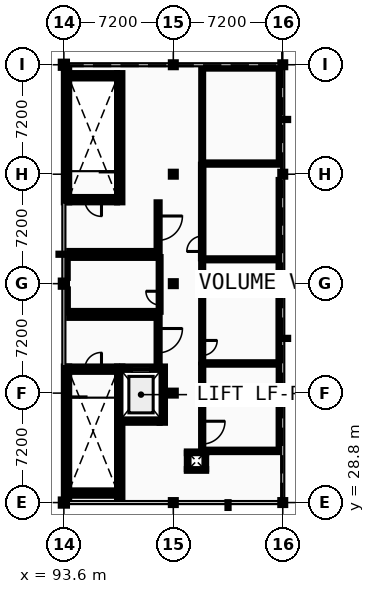
"""IFC4 building model, lengths in metres.
Left out: names, types, materials, properties, quantities, classifications, styles, units other than length and angle.
Written with IfcOpenShell. Run it as: python <this file> out.ifc"""

import sys

from ifc_helpers import new_model, si_unit, direction, frame, frame_2d, origin, origin_2d, place, context, subcontext, project, spatial, rectangle, hollow_circle, extrude, element, fill, save


model = new_model("IFC4")
c1 = context("Model", 3, precision=1e-05, world=origin(), true_north=direction((0.0, 1.0)))
c2 = subcontext(c1, "Body", "Model", "MODEL_VIEW")
j1 = project(units=[si_unit("LENGTHUNIT", "METRE"), si_unit("PLANEANGLEUNIT", "RADIAN")], contexts=[c1])
p1 = place(None, origin())
s1 = spatial("IfcSite", under=j1, at=p1, CompositionType="ELEMENT")
p2 = place(p1, origin())
s2 = spatial("IfcBuilding", under=s1, at=p2, CompositionType="ELEMENT")
p3 = place(p2, frame((0.0, 0.0, 9.6)))
s3 = spatial("IfcBuildingStorey", under=s2, at=p3, CompositionType="ELEMENT", Elevation=9.6)
for number, where, z_axis, x_axis in (
    (1, (93.6, 28.8, 0.0), (0.0, 0.0, 1.0), (1.0, 0.0, 0.0)),
    (2, (93.6, 43.2, 0.0), (0.0, 0.0, 1.0), (1.0, 0.0, 0.0)),
    (3, (93.6, 57.6, 0.0), (0.0, 0.0, 1.0), (1.0, 0.0, 0.0)),
):
    element("IfcColumn", number, at=place(p3, frame(where, z_axis=z_axis, x_axis=x_axis)), inside=s3, PredefinedType="COLUMN", context=c2, shape_type="SweptSolid", body=[
        extrude(hollow_circle(Radius=0.203, WallThickness=0.016, at=origin_2d()), origin(), (0.0, 0.0, 1.0), 4.4),
    ])
for number, where, z_axis, x_axis in (
    (4, (100.8, 28.8, 0.0), (0.0, 0.0, 1.0), (1.0, 0.0, 0.0)),
    (5, (100.8, 36.0, 0.0), (0.0, 0.0, 1.0), (1.0, 0.0, 0.0)),
    (6, (100.8, 43.2, 0.0), (0.0, 0.0, 1.0), (1.0, 0.0, 0.0)),
    (7, (100.8, 50.4, 0.0), (0.0, 0.0, 1.0), (1.0, 0.0, 0.0)),
    (8, (100.8, 57.6, 0.0), (0.0, 0.0, 1.0), (1.0, 0.0, 0.0)),
    (9, (108.0, 28.8, 0.0), (0.0, 0.0, 1.0), (1.0, 0.0, 0.0)),
    (10, (108.0, 36.0, 0.0), (0.0, 0.0, 1.0), (1.0, 0.0, 0.0)),
    (11, (108.0, 43.2, 0.0), (0.0, 0.0, 1.0), (1.0, 0.0, 0.0)),
    (12, (108.0, 50.4, 0.0), (0.0, 0.0, 1.0), (1.0, 0.0, 0.0)),
    (13, (108.0, 57.6, 0.0), (0.0, 0.0, 1.0), (1.0, 0.0, 0.0)),
):
    element("IfcColumn", number, at=place(p3, frame(where, z_axis=z_axis, x_axis=x_axis)), inside=s3, PredefinedType="COLUMN", context=c2, shape_type="SweptSolid", body=[
        extrude(hollow_circle(Radius=0.162, WallThickness=0.012, at=origin_2d()), origin(), (0.0, 0.0, 1.0), 4.4),
    ])
p4 = place(p3, frame((93.95, 29.425, 0.0), z_axis=(0.0, 0.0, 1.0), x_axis=(1.0, 0.0, 0.0)))
e14 = element("IfcWall", 14, at=p4, inside=s3, PredefinedType="SHEAR", context=c2, shape_type="SweptSolid", body=[
    extrude(rectangle(XDim=3.15, YDim=0.35, at=frame_2d((1.575, 0.0))), origin(), (0.0, 0.0, 1.0), 4.18),
])
p5 = place(p3, frame((93.95, 37.575, 0.0), z_axis=(0.0, 0.0, 1.0), x_axis=(1.0, 0.0, 0.0)))
e15 = element("IfcWall", 15, at=p5, inside=s3, PredefinedType="SHEAR", context=c2, shape_type="SweptSolid", body=[
    extrude(rectangle(XDim=3.15, YDim=0.35, at=frame_2d((1.575, 0.0))), origin(), (0.0, 0.0, 1.0), 4.18),
])
p6 = place(p5, frame((1.025, 0.0, 0.0)))
e16 = element("IfcOpeningElement", 16, at=p6, cuts=e15, PredefinedType="OPENING", context=c2, shape_type="SweptSolid", body=[
    extrude(rectangle(XDim=1.1, YDim=2.15, at=frame_2d((0.55, 1.075))), frame((0.0, 0.185, 0.0), z_axis=(0.0, -1.0, 0.0), x_axis=(1.0, 0.0, 0.0)), (0.0, 0.0, 1.0), 0.37),
])
p7 = place(p3, frame((93.775, 29.0, 0.0), z_axis=(0.0, 0.0, 1.0), x_axis=(0.0, 1.0, 0.0)))
e17 = element("IfcWall", 17, at=p7, inside=s3, PredefinedType="SHEAR", context=c2, shape_type="SweptSolid", body=[
    extrude(rectangle(XDim=8.75, YDim=0.35, at=frame_2d((4.375, 0.0))), origin(), (0.0, 0.0, 1.0), 4.0),
])
p8 = place(p3, frame((97.275, 29.0, 0.0), z_axis=(0.0, 0.0, 1.0), x_axis=(0.0, 1.0, 0.0)))
e18 = element("IfcWall", 18, at=p8, inside=s3, PredefinedType="SHEAR", context=c2, shape_type="SweptSolid", body=[
    extrude(rectangle(XDim=8.75, YDim=0.35, at=frame_2d((4.375, 0.0))), origin(), (0.0, 0.0, 1.0), 4.18),
])
p9 = place(p3, frame((97.45, 34.225, 0.0), z_axis=(0.0, 0.0, 1.0), x_axis=(1.0, 0.0, 0.0)))
e19 = element("IfcWall", 19, at=p9, inside=s3, PredefinedType="SHEAR", context=c2, shape_type="SweptSolid", body=[
    extrude(rectangle(XDim=2.45, YDim=0.35, at=frame_2d((1.225, 0.0))), origin(), (0.0, 0.0, 1.0), 4.18),
])
p10 = place(p3, frame((97.45, 37.575, 0.0), z_axis=(0.0, 0.0, 1.0), x_axis=(1.0, 0.0, 0.0)))
e20 = element("IfcWall", 20, at=p10, inside=s3, PredefinedType="SHEAR", context=c2, shape_type="SweptSolid", body=[
    extrude(rectangle(XDim=2.45, YDim=0.35, at=frame_2d((1.225, 0.0))), origin(), (0.0, 0.0, 1.0), 4.18),
])
p11 = place(p10, frame((0.625, 0.0, 0.0)))
e21 = element("IfcOpeningElement", 21, at=p11, cuts=e20, PredefinedType="OPENING", context=c2, shape_type="SweptSolid", body=[
    extrude(rectangle(XDim=1.2, YDim=2.2, at=frame_2d((0.6, 1.1))), frame((0.0, 0.185, 0.0), z_axis=(0.0, -1.0, 0.0), x_axis=(1.0, 0.0, 0.0)), (0.0, 0.0, 1.0), 0.37),
])
p12 = place(p3, frame((100.075, 34.05, 0.0), z_axis=(0.0, 0.0, 1.0), x_axis=(0.0, 1.0, 0.0)))
e22 = element("IfcWall", 22, at=p12, inside=s3, PredefinedType="SHEAR", context=c2, shape_type="SweptSolid", body=[
    extrude(rectangle(XDim=3.7, YDim=0.35, at=frame_2d((1.85, 0.0))), origin(), (0.0, 0.0, 1.0), 4.18),
])
p13 = place(p3, frame((99.8, 37.75, 0.0), z_axis=(0.0, 0.0, 1.0), x_axis=(0.0, 1.0, 0.0)))
e23 = element("IfcWall", 23, at=p13, inside=s3, PredefinedType="PARTITIONING", context=c2, shape_type="SweptSolid", body=[
    extrude(rectangle(XDim=3.4, YDim=0.2, at=frame_2d((1.7, 0.0))), origin(), (0.0, 0.0, 1.0), 4.18),
])
p14 = place(p13, frame((0.9, 0.0, 0.0)))
e24 = element("IfcOpeningElement", 24, at=p14, cuts=e23, PredefinedType="OPENING", context=c2, shape_type="SweptSolid", body=[
    extrude(rectangle(XDim=1.6, YDim=2.2, at=frame_2d((0.8, 1.1))), frame((0.0, 0.11, 0.0), z_axis=(0.0, -1.0, 0.0), x_axis=(1.0, 0.0, 0.0)), (0.0, 0.0, 1.0), 0.22),
])
p15 = place(p3, frame((93.95, 41.05, 0.0), z_axis=(0.0, 0.0, 1.0), x_axis=(1.0, 0.0, 0.0)))
e25 = element("IfcWall", 25, at=p15, inside=s3, PredefinedType="PARTITIONING", context=c2, shape_type="SweptSolid", body=[
    extrude(rectangle(XDim=5.75, YDim=0.2, at=frame_2d((2.875, 0.0))), origin(), (0.0, 0.0, 1.0), 4.18),
])
p16 = place(p3, frame((93.95, 48.725, 0.0), z_axis=(0.0, 0.0, 1.0), x_axis=(1.0, 0.0, 0.0)))
e26 = element("IfcWall", 26, at=p16, inside=s3, PredefinedType="SHEAR", context=c2, shape_type="SweptSolid", body=[
    extrude(rectangle(XDim=3.15, YDim=0.35, at=frame_2d((1.575, 0.0))), origin(), (0.0, 0.0, 1.0), 4.18),
])
p17 = place(p16, frame((1.025, 0.0, 0.0)))
e27 = element("IfcOpeningElement", 27, at=p17, cuts=e26, PredefinedType="OPENING", context=c2, shape_type="SweptSolid", body=[
    extrude(rectangle(XDim=1.1, YDim=2.15, at=frame_2d((0.55, 1.075))), frame((0.0, 0.185, 0.0), z_axis=(0.0, -1.0, 0.0), x_axis=(1.0, 0.0, 0.0)), (0.0, 0.0, 1.0), 0.37),
])
p18 = place(p3, frame((93.95, 56.875, 0.0), z_axis=(0.0, 0.0, 1.0), x_axis=(1.0, 0.0, 0.0)))
e28 = element("IfcWall", 28, at=p18, inside=s3, PredefinedType="SHEAR", context=c2, shape_type="SweptSolid", body=[
    extrude(rectangle(XDim=3.15, YDim=0.35, at=frame_2d((1.575, 0.0))), origin(), (0.0, 0.0, 1.0), 4.18),
])
p19 = place(p3, frame((93.775, 48.55, 0.0), z_axis=(0.0, 0.0, 1.0), x_axis=(0.0, 1.0, 0.0)))
e29 = element("IfcWall", 29, at=p19, inside=s3, PredefinedType="SHEAR", context=c2, shape_type="SweptSolid", body=[
    extrude(rectangle(XDim=8.847, YDim=0.35, at=frame_2d((4.423, 0.0))), origin(), (0.0, 0.0, 1.0), 4.0),
])
p20 = place(p3, frame((97.275, 48.55, 0.0), z_axis=(0.0, 0.0, 1.0), x_axis=(0.0, 1.0, 0.0)))
e30 = element("IfcWall", 30, at=p20, inside=s3, PredefinedType="SHEAR", context=c2, shape_type="SweptSolid", body=[
    extrude(rectangle(XDim=8.5, YDim=0.35, at=frame_2d((4.25, 0.0))), origin(), (0.0, 0.0, 1.0), 4.18),
])
p21 = place(p3, frame((99.8, 45.15, 0.0), z_axis=(0.0, 0.0, 1.0), x_axis=(0.0, 1.0, 0.0)))
e31 = element("IfcWall", 31, at=p21, inside=s3, PredefinedType="PARTITIONING", context=c2, shape_type="SweptSolid", body=[
    extrude(rectangle(XDim=3.4, YDim=0.2, at=frame_2d((1.7, 0.0))), origin(), (0.0, 0.0, 1.0), 4.18),
])
p22 = place(p21, frame((0.9, 0.0, 0.0)))
e32 = element("IfcOpeningElement", 32, at=p22, cuts=e31, PredefinedType="OPENING", context=c2, shape_type="SweptSolid", body=[
    extrude(rectangle(XDim=1.6, YDim=2.2, at=frame_2d((0.8, 1.1))), frame((0.0, 0.11, 0.0), z_axis=(0.0, -1.0, 0.0), x_axis=(1.0, 0.0, 0.0)), (0.0, 0.0, 1.0), 0.22),
])
p23 = place(p3, frame((93.95, 45.25, 0.0), z_axis=(0.0, 0.0, 1.0), x_axis=(1.0, 0.0, 0.0)))
e33 = element("IfcWall", 33, at=p23, inside=s3, PredefinedType="PARTITIONING", context=c2, shape_type="SweptSolid", body=[
    extrude(rectangle(XDim=5.75, YDim=0.2, at=frame_2d((2.875, 0.0))), origin(), (0.0, 0.0, 1.0), 4.18),
])
for number, where, z_axis, x_axis in (
    (34, (101.69, 30.945, 0.0), (0.0, 0.0, 1.0), (1.0, 0.0, 0.0)),
    (35, (101.69, 32.105, 0.0), (0.0, 0.0, 1.0), (1.0, 0.0, 0.0)),
):
    element("IfcWall", number, at=place(p3, frame(where, z_axis=z_axis, x_axis=x_axis)), inside=s3, PredefinedType="PARTITIONING", context=c2, shape_type="SweptSolid", body=[
        extrude(rectangle(XDim=1.27, YDim=0.11, at=frame_2d((0.635, 0.0))), origin(), (0.0, 0.0, 1.0), 4.18),
    ])
for number, where, z_axis, x_axis in (
    (36, (101.745, 31.0, 0.0), (0.0, 0.0, 1.0), (0.0, 1.0, 0.0)),
    (37, (102.905, 31.0, 0.0), (0.0, 0.0, 1.0), (0.0, 1.0, 0.0)),
):
    element("IfcWall", number, at=place(p3, frame(where, z_axis=z_axis, x_axis=x_axis)), inside=s3, PredefinedType="PARTITIONING", context=c2, shape_type="SweptSolid", body=[
        extrude(rectangle(XDim=1.05, YDim=0.11, at=frame_2d((0.525, 0.0))), origin(), (0.0, 0.0, 1.0), 4.18),
    ])
p24 = place(p3, frame((103.035, 32.2, 0.0), z_axis=(0.0, 0.0, 1.0), x_axis=(1.0, 0.0, 0.0)))
e38 = element("IfcWall", 38, at=p24, inside=s3, PredefinedType="PARTITIONING", context=c2, shape_type="SweptSolid", body=[
    extrude(rectangle(XDim=4.765, YDim=0.16, at=frame_2d((2.383, 0.0))), origin(), (0.0, 0.0, 1.0), 4.18),
])
p25 = place(p3, frame((102.7, 37.95, 0.0), z_axis=(0.0, 0.0, 1.0), x_axis=(1.0, 0.0, 0.0)))
e39 = element("IfcWall", 39, at=p25, inside=s3, PredefinedType="PARTITIONING", context=c2, shape_type="SweptSolid", body=[
    extrude(rectangle(XDim=5.1, YDim=0.16, at=frame_2d((2.55, 0.0))), origin(), (0.0, 0.0, 1.0), 4.18),
])
p26 = place(p3, frame((93.8, 41.35, 0.0), z_axis=(0.0, 0.0, 1.0), x_axis=(1.0, 0.0, 0.0)))
e40 = element("IfcWall", 40, at=p26, inside=s3, PredefinedType="PARTITIONING", context=c2, shape_type="SweptSolid", body=[
    extrude(rectangle(XDim=5.88, YDim=0.11, at=frame_2d((2.94, 0.0))), origin(), (0.0, 0.0, 1.0), 4.18),
])
p27 = place(p3, frame((102.7, 44.8, 0.0), z_axis=(0.0, 0.0, 1.0), x_axis=(1.0, 0.0, 0.0)))
e41 = element("IfcWall", 41, at=p27, inside=s3, PredefinedType="PARTITIONING", context=c2, shape_type="SweptSolid", body=[
    extrude(rectangle(XDim=5.1, YDim=0.135, at=frame_2d((2.55, 0.0))), origin(), (0.0, 0.0, 1.0), 4.18),
])
p28 = place(p3, frame((93.8, 44.95, 0.0), z_axis=(0.0, 0.0, 1.0), x_axis=(1.0, 0.0, 0.0)))
e42 = element("IfcWall", 42, at=p28, inside=s3, PredefinedType="PARTITIONING", context=c2, shape_type="SweptSolid", body=[
    extrude(rectangle(XDim=5.88, YDim=0.11, at=frame_2d((2.94, 0.0))), origin(), (0.0, 0.0, 1.0), 4.18),
])
p29 = place(p3, frame((102.7, 51.1, 0.0), z_axis=(0.0, 0.0, 1.0), x_axis=(1.0, 0.0, 0.0)))
e43 = element("IfcWall", 43, at=p29, inside=s3, PredefinedType="PARTITIONING", context=c2, shape_type="SweptSolid", body=[
    extrude(rectangle(XDim=5.1, YDim=0.15, at=frame_2d((2.55, 0.0))), origin(), (0.0, 0.0, 1.0), 4.18),
])
p30 = place(p3, frame((102.7, 57.4, 0.0), z_axis=(0.0, 0.0, 1.0), x_axis=(1.0, 0.0, 0.0)))
e44 = element("IfcWall", 44, at=p30, inside=s3, PredefinedType="PARTITIONING", context=c2, shape_type="SweptSolid", body=[
    extrude(rectangle(XDim=4.92, YDim=0.11, at=frame_2d((2.46, 0.0))), origin(), (0.0, 0.0, 1.0), 4.005),
])
p31 = place(p3, frame((93.8, 41.405, 0.0), z_axis=(0.0, 0.0, 1.0), x_axis=(0.0, 1.0, 0.0)))
e45 = element("IfcWall", 45, at=p31, inside=s3, PredefinedType="PARTITIONING", context=c2, shape_type="SweptSolid", body=[
    extrude(rectangle(XDim=1.415, YDim=0.125, at=frame_2d((0.708, 0.0))), origin(), (0.0, 0.0, 1.0), 3.985),
])
p32 = place(p3, frame((93.8, 43.58, 0.0), z_axis=(0.0, 0.0, 1.0), x_axis=(0.0, 1.0, 0.0)))
e46 = element("IfcWall", 46, at=p32, inside=s3, PredefinedType="PARTITIONING", context=c2, shape_type="SweptSolid", body=[
    extrude(rectangle(XDim=1.315, YDim=0.11, at=frame_2d((0.657, 0.0))), origin(), (0.0, 0.0, 1.0), 3.985),
])
p33 = place(p3, frame((99.9, 41.35, 0.0), z_axis=(0.0, 0.0, 1.0), x_axis=(0.0, 1.0, 0.0)))
e47 = element("IfcWall", 47, at=p33, inside=s3, PredefinedType="PARTITIONING", context=c2, shape_type="SweptSolid", body=[
    extrude(rectangle(XDim=3.6, YDim=0.125, at=frame_2d((1.8, 0.0))), origin(), (0.0, 0.0, 1.0), 4.18),
])
p34 = place(p33, frame((0.45, 0.0, 0.0)))
e48 = element("IfcOpeningElement", 48, at=p34, cuts=e47, PredefinedType="OPENING", context=c2, shape_type="SweptSolid", body=[
    extrude(rectangle(XDim=0.9, YDim=2.1, at=frame_2d((0.45, 1.05))), frame((0.0, 0.073, 0.0), z_axis=(0.0, -1.0, 0.0), x_axis=(1.0, 0.0, 0.0)), (0.0, 0.0, 1.0), 0.145),
])
p35 = place(p3, frame((102.7, 32.2, 0.0), z_axis=(0.0, 0.0, 1.0), x_axis=(0.0, 1.0, 0.0)))
e49 = element("IfcWall", 49, at=p35, inside=s3, PredefinedType="PARTITIONING", context=c2, shape_type="SweptSolid", body=[
    extrude(rectangle(XDim=5.67, YDim=0.142, at=frame_2d((2.835, 0.0))), origin(), (0.0, 0.0, 1.0), 4.18),
])
p36 = place(p35, frame((0.45, 0.0, 0.0)))
e50 = element("IfcOpeningElement", 50, at=p36, cuts=e49, PredefinedType="OPENING", context=c2, shape_type="SweptSolid", body=[
    extrude(rectangle(XDim=1.5, YDim=2.2, at=frame_2d((0.75, 1.1))), frame((0.0, 0.081, 0.0), z_axis=(0.0, -1.0, 0.0), x_axis=(1.0, 0.0, 0.0)), (0.0, 0.0, 1.0), 0.162),
])
p37 = place(p3, frame((102.7, 38.03, 0.0), z_axis=(0.0, 0.0, 1.0), x_axis=(0.0, 1.0, 0.0)))
e51 = element("IfcWall", 51, at=p37, inside=s3, PredefinedType="PARTITIONING", context=c2, shape_type="SweptSolid", body=[
    extrude(rectangle(XDim=6.702, YDim=0.135, at=frame_2d((3.351, 0.0))), origin(), (0.0, 0.0, 1.0), 4.18),
])
p38 = place(p37, frame((0.45, 0.0, 0.0)))
e52 = element("IfcOpeningElement", 52, at=p38, cuts=e51, PredefinedType="OPENING", context=c2, shape_type="SweptSolid", body=[
    extrude(rectangle(XDim=0.984, YDim=2.152, at=frame_2d((0.492, 1.076))), frame((0.0, 0.078, 0.0), z_axis=(0.0, -1.0, 0.0), x_axis=(1.0, 0.0, 0.0)), (0.0, 0.0, 1.0), 0.155),
])
p39 = place(p3, frame((102.7, 44.867, 0.0), z_axis=(0.0, 0.0, 1.0), x_axis=(0.0, 1.0, 0.0)))
e53 = element("IfcWall", 53, at=p39, inside=s3, PredefinedType="PARTITIONING", context=c2, shape_type="SweptSolid", body=[
    extrude(rectangle(XDim=6.157, YDim=0.16, at=frame_2d((3.079, 0.0))), origin(), (0.0, 0.0, 1.0), 4.18),
])
p40 = place(p39, frame((0.45, 0.0, 0.0)))
e54 = element("IfcOpeningElement", 54, at=p40, cuts=e53, PredefinedType="OPENING", context=c2, shape_type="SweptSolid", body=[
    extrude(rectangle(XDim=1.01, YDim=2.152, at=frame_2d((0.505, 1.076))), frame((0.0, 0.09, 0.0), z_axis=(0.0, -1.0, 0.0), x_axis=(1.0, 0.0, 0.0)), (0.0, 0.0, 1.0), 0.18),
])
p41 = place(p3, frame((102.7, 51.175, 0.0), z_axis=(0.0, 0.0, 1.0), x_axis=(0.0, 1.0, 0.0)))
e55 = element("IfcWall", 55, at=p41, inside=s3, PredefinedType="PARTITIONING", context=c2, shape_type="SweptSolid", body=[
    extrude(rectangle(XDim=6.17, YDim=0.125, at=frame_2d((3.085, 0.0))), origin(), (0.0, 0.0, 1.0), 4.18),
])
p42 = place(p41, frame((2.585, 0.0, 0.0)))
e56 = element("IfcOpeningElement", 56, at=p42, cuts=e55, PredefinedType="OPENING", context=c2, shape_type="SweptSolid", body=[
    extrude(rectangle(XDim=1.0, YDim=2.1, at=frame_2d((0.5, 1.05))), frame((0.0, 0.073, 0.0), z_axis=(0.0, -1.0, 0.0), x_axis=(1.0, 0.0, 0.0)), (0.0, 0.0, 1.0), 0.145),
])
p43 = place(p3, frame((107.8, 32.28, 0.0), z_axis=(0.0, 0.0, 1.0), x_axis=(0.0, 1.0, 0.0)))
e57 = element("IfcWall", 57, at=p43, inside=s3, PredefinedType="PARTITIONING", context=c2, shape_type="SweptSolid", body=[
    extrude(rectangle(XDim=3.34, YDim=0.142, at=frame_2d((1.67, 0.0))), origin(), (0.0, 0.0, 1.0), 4.18),
])
p44 = place(p3, frame((107.8, 36.38, 0.0), z_axis=(0.0, 0.0, 1.0), x_axis=(0.0, 1.0, 0.0)))
e58 = element("IfcWall", 58, at=p44, inside=s3, PredefinedType="PARTITIONING", context=c2, shape_type="SweptSolid", body=[
    extrude(rectangle(XDim=1.49, YDim=0.135, at=frame_2d((0.745, 0.0))), origin(), (0.0, 0.0, 1.0), 4.18),
])
p45 = place(p3, frame((107.8, 38.03, 0.0), z_axis=(0.0, 0.0, 1.0), x_axis=(0.0, 1.0, 0.0)))
e59 = element("IfcWall", 59, at=p45, inside=s3, PredefinedType="PARTITIONING", context=c2, shape_type="SweptSolid", body=[
    extrude(rectangle(XDim=4.79, YDim=0.16, at=frame_2d((2.395, 0.0))), origin(), (0.0, 0.0, 1.0), 4.18),
])
p46 = place(p3, frame((107.8, 43.58, 0.0), z_axis=(0.0, 0.0, 1.0), x_axis=(0.0, 1.0, 0.0)))
e60 = element("IfcWall", 60, at=p46, inside=s3, PredefinedType="PARTITIONING", context=c2, shape_type="SweptSolid", body=[
    extrude(rectangle(XDim=1.152, YDim=0.15, at=frame_2d((0.576, 0.0))), origin(), (0.0, 0.0, 1.0), 4.18),
])
p47 = place(p3, frame((107.8, 44.867, 0.0), z_axis=(0.0, 0.0, 1.0), x_axis=(0.0, 1.0, 0.0)))
e61 = element("IfcWall", 61, at=p47, inside=s3, PredefinedType="PARTITIONING", context=c2, shape_type="SweptSolid", body=[
    extrude(rectangle(XDim=5.153, YDim=0.142, at=frame_2d((2.576, 0.0))), origin(), (0.0, 0.0, 1.0), 4.18),
])
p48 = place(p3, frame((107.8, 51.175, 0.0), z_axis=(0.0, 0.0, 1.0), x_axis=(0.0, 1.0, 0.0)))
e62 = element("IfcWall", 62, at=p48, inside=s3, PredefinedType="PARTITIONING", context=c2, shape_type="SweptSolid", body=[
    extrude(rectangle(XDim=6.045, YDim=0.125, at=frame_2d((3.022, 0.0))), origin(), (0.0, 0.0, 1.0), 4.18),
])
p49 = place(p6, frame((1.1, 0.0, 0.0), z_axis=(0.0, 0.0, 1.0), x_axis=(-1.0, 0.0, 0.0)))
e63 = element("IfcDoor", 63, at=p49, inside=s3, OperationType="SINGLE_SWING_RIGHT", PredefinedType="DOOR", context=c2, shape_type="SweptSolid", body=[
    extrude(rectangle(XDim=1.1, YDim=2.15, at=frame_2d((0.55, 1.075))), frame((0.0, 0.025, 0.0), z_axis=(0.0, -1.0, 0.0), x_axis=(1.0, 0.0, 0.0)), (0.0, 0.0, 1.0), 0.05),
])
fill(e16, e63)
p50 = place(p11, origin())
e64 = element("IfcDoor", 64, at=p50, inside=s3, OperationType="SLIDING_TO_RIGHT", PredefinedType="DOOR", context=c2, shape_type="SweptSolid", body=[
    extrude(rectangle(XDim=1.2, YDim=2.2, at=frame_2d((0.6, 1.1))), frame((0.0, 0.025, 0.0), z_axis=(0.0, -1.0, 0.0), x_axis=(1.0, 0.0, 0.0)), (0.0, 0.0, 1.0), 0.05),
])
fill(e21, e64)
p51 = place(p14, origin())
e65 = element("IfcDoor", 65, at=p51, inside=s3, OperationType="DOUBLE_DOOR_SINGLE_SWING", PredefinedType="DOOR", context=c2, shape_type="SweptSolid", body=[
    extrude(rectangle(XDim=1.6, YDim=2.2, at=frame_2d((0.8, 1.1))), frame((0.0, 0.025, 0.0), z_axis=(0.0, -1.0, 0.0), x_axis=(1.0, 0.0, 0.0)), (0.0, 0.0, 1.0), 0.05),
])
fill(e24, e65)
p52 = place(p17, origin())
e66 = element("IfcDoor", 66, at=p52, inside=s3, OperationType="SINGLE_SWING_RIGHT", PredefinedType="DOOR", context=c2, shape_type="SweptSolid", body=[
    extrude(rectangle(XDim=1.1, YDim=2.15, at=frame_2d((0.55, 1.075))), frame((0.0, 0.025, 0.0), z_axis=(0.0, -1.0, 0.0), x_axis=(1.0, 0.0, 0.0)), (0.0, 0.0, 1.0), 0.05),
])
fill(e27, e66)
p53 = place(p22, origin())
e67 = element("IfcDoor", 67, at=p53, inside=s3, OperationType="DOUBLE_DOOR_SINGLE_SWING", PredefinedType="DOOR", context=c2, shape_type="SweptSolid", body=[
    extrude(rectangle(XDim=1.6, YDim=2.2, at=frame_2d((0.8, 1.1))), frame((0.0, 0.025, 0.0), z_axis=(0.0, -1.0, 0.0), x_axis=(1.0, 0.0, 0.0)), (0.0, 0.0, 1.0), 0.05),
])
fill(e32, e67)
p54 = place(p36, origin())
e68 = element("IfcDoor", 68, at=p54, inside=s3, OperationType="DOUBLE_DOOR_SINGLE_SWING", PredefinedType="DOOR", context=c2, shape_type="SweptSolid", body=[
    extrude(rectangle(XDim=1.5, YDim=2.2, at=frame_2d((0.75, 1.1))), frame((0.0, 0.025, 0.0), z_axis=(0.0, -1.0, 0.0), x_axis=(1.0, 0.0, 0.0)), (0.0, 0.0, 1.0), 0.05),
])
fill(e50, e68)
p55 = place(p38, origin())
e69 = element("IfcDoor", 69, at=p55, inside=s3, OperationType="SINGLE_SWING_RIGHT", PredefinedType="DOOR", context=c2, shape_type="SweptSolid", body=[
    extrude(rectangle(XDim=0.984, YDim=2.152, at=frame_2d((0.492, 1.076))), frame((0.0, 0.025, 0.0), z_axis=(0.0, -1.0, 0.0), x_axis=(1.0, 0.0, 0.0)), (0.0, 0.0, 1.0), 0.05),
])
fill(e52, e69)
p56 = place(p40, origin())
e70 = element("IfcDoor", 70, at=p56, inside=s3, OperationType="SINGLE_SWING_LEFT", PredefinedType="DOOR", context=c2, shape_type="SweptSolid", body=[
    extrude(rectangle(XDim=1.01, YDim=2.152, at=frame_2d((0.505, 1.076))), frame((0.0, 0.025, 0.0), z_axis=(0.0, -1.0, 0.0), x_axis=(1.0, 0.0, 0.0)), (0.0, 0.0, 1.0), 0.05),
])
fill(e54, e70)
p57 = place(p42, origin())
e71 = element("IfcDoor", 71, at=p57, inside=s3, OperationType="SLIDING_TO_LEFT", PredefinedType="DOOR", context=c2, shape_type="SweptSolid", body=[
    extrude(rectangle(XDim=1.0, YDim=2.1, at=frame_2d((0.5, 1.05))), frame((0.0, 0.025, 0.0), z_axis=(0.0, -1.0, 0.0), x_axis=(1.0, 0.0, 0.0)), (0.0, 0.0, 1.0), 0.05),
])
fill(e56, e71)
p58 = place(p34, frame((0.9, 0.0, 0.0), z_axis=(0.0, 0.0, 1.0), x_axis=(-1.0, 0.0, 0.0)))
e72 = element("IfcDoor", 72, at=p58, inside=s3, OperationType="SINGLE_SWING_RIGHT", PredefinedType="DOOR", context=c2, shape_type="SweptSolid", body=[
    extrude(rectangle(XDim=0.9, YDim=2.1, at=frame_2d((0.45, 1.05))), frame((0.0, 0.025, 0.0), z_axis=(0.0, -1.0, 0.0), x_axis=(1.0, 0.0, 0.0)), (0.0, 0.0, 1.0), 0.05),
])
fill(e48, e72)
save(model, sys.argv[1])
